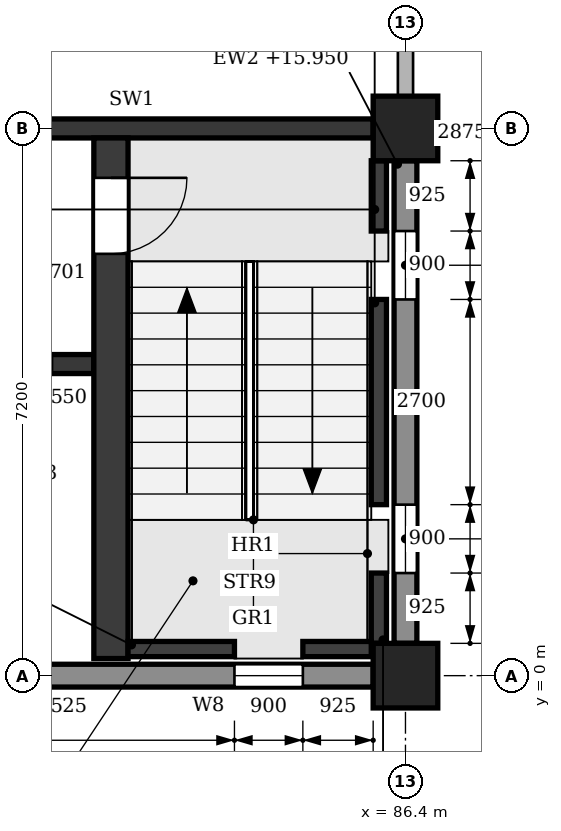
"""IFC4 building model, lengths in metres.
Left out: names, types, materials, properties, quantities, classifications, styles, units other than length and angle.
Written with IfcOpenShell. Run it as: python <this file> out.ifc"""

import sys

from ifc_helpers import new_model, si_unit, direction, frame, frame_2d, origin, origin_2d, place, context, subcontext, project, spatial, polyline, rectangle, outline, extrude, element, fill, save


model = new_model("IFC4")
c1 = context("Model", 3, precision=1e-05, world=origin(), true_north=direction((0.0, 1.0)))
c2 = subcontext(c1, "Body", "Model", "MODEL_VIEW")
j1 = project(units=[si_unit("LENGTHUNIT", "METRE"), si_unit("PLANEANGLEUNIT", "RADIAN")], contexts=[c1])
p1 = place(None, origin())
s1 = spatial("IfcSite", under=j1, at=p1, CompositionType="ELEMENT")
p2 = place(p1, origin())
s2 = spatial("IfcBuilding", under=s1, at=p2, CompositionType="ELEMENT")
p3 = place(p2, frame((0.0, 0.0, 11.4)))
s3 = spatial("IfcBuildingStorey", under=s2, at=p3, CompositionType="ELEMENT", Elevation=11.4)
for number, where, z_axis, x_axis in (
    (1, (86.4, 0.0, 0.0), (0.0, 0.0, 1.0), (1.0, 0.0, 0.0)),
    (2, (86.4, 7.2, 0.0), (0.0, 0.0, 1.0), (1.0, 0.0, 0.0)),
):
    element("IfcColumn", number, at=place(p3, frame(where, z_axis=z_axis, x_axis=x_axis)), inside=s3, PredefinedType="COLUMN", context=c2, shape_type="SweptSolid", body=[
        extrude(rectangle(XDim=0.85, YDim=0.85, at=origin_2d()), origin(), (0.0, 0.0, 1.0), 5.4),
    ])
p4 = place(p3, frame((79.625, 0.0, 0.0), z_axis=(0.0, 0.0, 1.0), x_axis=(1.0, 0.0, 0.0)))
e3 = element("IfcWall", 3, at=p4, inside=s3, PredefinedType="STANDARD", context=c2, shape_type="SweptSolid", body=[
    extrude(rectangle(XDim=6.35, YDim=0.3, at=frame_2d((3.175, 0.0))), origin(), (0.0, 0.0, 1.0), 4.55),
])
p5 = place(p4, frame((4.525, 0.0, 0.9)))
e4 = element("IfcOpeningElement", 4, at=p5, cuts=e3, PredefinedType="OPENING", context=c2, shape_type="SweptSolid", body=[
    extrude(outline(polyline([(0.0, 0.0), (0.9, 0.0), (0.9, 2.65), (0.45, 3.1), (0.0, 2.65), (0.0, 0.0)])), frame((0.0, 0.16, 0.0), z_axis=(0.0, -1.0, 0.0), x_axis=(1.0, 0.0, 0.0)), (0.0, 0.0, 1.0), 0.32),
])
p6 = place(p3, frame((86.4, 0.425, 0.0), z_axis=(0.0, 0.0, 1.0), x_axis=(0.0, 1.0, 0.0)))
e5 = element("IfcWall", 5, at=p6, inside=s3, PredefinedType="STANDARD", context=c2, shape_type="SweptSolid", body=[
    extrude(rectangle(XDim=6.35, YDim=0.3, at=frame_2d((3.175, 0.0))), origin(), (0.0, 0.0, 1.0), 4.55),
])
p7 = place(p6, frame((0.925, 0.0, 0.9)))
e6 = element("IfcOpeningElement", 6, at=p7, cuts=e5, PredefinedType="OPENING", context=c2, shape_type="SweptSolid", body=[
    extrude(outline(polyline([(0.0, 0.0), (0.9, 0.0), (0.9, 2.65), (0.45, 3.1), (0.0, 2.65), (0.0, 0.0)])), frame((0.0, 0.16, 0.0), z_axis=(0.0, -1.0, 0.0), x_axis=(1.0, 0.0, 0.0)), (0.0, 0.0, 1.0), 0.32),
])
p8 = place(p6, frame((4.525, 0.0, 0.9)))
e7 = element("IfcOpeningElement", 7, at=p8, cuts=e5, PredefinedType="OPENING", context=c2, shape_type="SweptSolid", body=[
    extrude(outline(polyline([(0.0, 0.0), (0.9, 0.0), (0.9, 2.65), (0.45, 3.1), (0.0, 2.65), (0.0, 0.0)])), frame((0.0, 0.16, 0.0), z_axis=(0.0, -1.0, 0.0), x_axis=(1.0, 0.0, 0.0)), (0.0, 0.0, 1.0), 0.32),
])
p9 = place(p3, frame((79.625, 7.2, 0.0), z_axis=(0.0, 0.0, 1.0), x_axis=(1.0, 0.0, 0.0)))
e8 = element("IfcWall", 8, at=p9, inside=s3, PredefinedType="SHEAR", context=c2, shape_type="SweptSolid", body=[
    extrude(rectangle(XDim=6.35, YDim=0.25, at=frame_2d((3.175, 0.0))), origin(), (0.0, 0.0, 1.0), 4.4),
])
p10 = place(p9, frame((0.425, 0.0, 0.0)))
e9 = element("IfcOpeningElement", 9, at=p10, cuts=e8, PredefinedType="OPENING", context=c2, shape_type="SweptSolid", body=[
    extrude(rectangle(XDim=1.1, YDim=2.1, at=frame_2d((0.55, 1.05))), frame((0.0, 0.135, 0.0), z_axis=(0.0, -1.0, 0.0), x_axis=(1.0, 0.0, 0.0)), (0.0, 0.0, 1.0), 0.27),
])
p11 = place(p3, frame((86.05, 0.425, -0.25), z_axis=(0.0, 0.0, 1.0), x_axis=(0.0, 1.0, 0.0)))
e10 = element("IfcWall", 10, at=p11, inside=s3, PredefinedType="SHEAR", context=c2, shape_type="SweptSolid", body=[
    extrude(rectangle(XDim=0.925, YDim=0.2, at=frame_2d((0.462, 0.0))), origin(), (0.0, 0.0, 1.0), 5.4),
])
p12 = place(p3, frame((86.05, 2.25, -0.25), z_axis=(0.0, 0.0, 1.0), x_axis=(0.0, 1.0, 0.0)))
e11 = element("IfcWall", 11, at=p12, inside=s3, PredefinedType="SHEAR", context=c2, shape_type="SweptSolid", body=[
    extrude(rectangle(XDim=2.7, YDim=0.2, at=frame_2d((1.35, 0.0))), origin(), (0.0, 0.0, 1.0), 5.4),
])
p13 = place(p3, frame((86.05, 5.85, -0.25), z_axis=(0.0, 0.0, 1.0), x_axis=(0.0, 1.0, 0.0)))
e12 = element("IfcWall", 12, at=p13, inside=s3, PredefinedType="SHEAR", context=c2, shape_type="SweptSolid", body=[
    extrude(rectangle(XDim=0.925, YDim=0.2, at=frame_2d((0.462, 0.0))), origin(), (0.0, 0.0, 1.0), 5.4),
])
p14 = place(p3, frame((82.75, 0.35, -0.25), z_axis=(0.0, 0.0, 1.0), x_axis=(1.0, 0.0, 0.0)))
e13 = element("IfcWall", 13, at=p14, inside=s3, PredefinedType="SHEAR", context=c2, shape_type="SweptSolid", body=[
    extrude(rectangle(XDim=1.4, YDim=0.2, at=frame_2d((0.7, 0.0))), origin(), (0.0, 0.0, 1.0), 5.4),
])
p15 = place(p3, frame((85.05, 0.35, -0.25), z_axis=(0.0, 0.0, 1.0), x_axis=(1.0, 0.0, 0.0)))
e14 = element("IfcWall", 14, at=p15, inside=s3, PredefinedType="SHEAR", context=c2, shape_type="SweptSolid", body=[
    extrude(rectangle(XDim=0.9, YDim=0.2, at=frame_2d((0.45, 0.0))), origin(), (0.0, 0.0, 1.0), 5.4),
])
p16 = place(p3, frame((82.525, 0.225, 0.0), z_axis=(0.0, 0.0, 1.0), x_axis=(0.0, 1.0, 0.0)))
e15 = element("IfcWall", 15, at=p16, inside=s3, PredefinedType="SHEAR", context=c2, shape_type="SweptSolid", body=[
    extrude(rectangle(XDim=6.85, YDim=0.45, at=frame_2d((3.425, 0.0))), origin(), (0.0, 0.0, 1.0), 5.15),
])
p17 = place(p16, frame((5.325, 0.0, 0.0)))
e16 = element("IfcOpeningElement", 16, at=p17, cuts=e15, PredefinedType="OPENING", context=c2, shape_type="SweptSolid", body=[
    extrude(rectangle(XDim=1.0, YDim=2.1, at=frame_2d((0.5, 1.05))), frame((0.0, 0.235, 0.0), z_axis=(0.0, -1.0, 0.0), x_axis=(1.0, 0.0, 0.0)), (0.0, 0.0, 1.0), 0.47),
])
p18 = place(p3, frame((79.325, 4.1, 0.0), z_axis=(0.0, 0.0, 1.0), x_axis=(1.0, 0.0, 0.0)))
e17 = element("IfcWall", 17, at=p18, inside=s3, PredefinedType="SHEAR", context=c2, shape_type="SweptSolid", body=[
    extrude(rectangle(XDim=2.975, YDim=0.25, at=frame_2d((1.488, 0.0))), origin(), (0.0, 0.0, 1.0), 5.15),
])
p19 = place(p18, frame((1.525, 0.0, 0.0)))
e18 = element("IfcOpeningElement", 18, at=p19, cuts=e17, PredefinedType="OPENING", context=c2, shape_type="SweptSolid", body=[
    extrude(rectangle(XDim=0.9, YDim=2.1, at=frame_2d((0.45, 1.05))), frame((0.0, 0.135, 0.0), z_axis=(0.0, -1.0, 0.0), x_axis=(1.0, 0.0, 0.0)), (0.0, 0.0, 1.0), 0.27),
])
p20 = place(p7, origin())
e19 = element("IfcWindow", 19, at=p20, inside=s3, PartitioningType="SINGLE_PANEL", PredefinedType="WINDOW", context=c2, shape_type="SweptSolid", body=[
    extrude(outline(polyline([(0.0, 0.0), (0.9, 0.0), (0.9, 2.65), (0.45, 3.1), (0.0, 2.65), (0.0, 0.0)])), frame((0.0, 0.03, 0.0), z_axis=(0.0, -1.0, 0.0), x_axis=(1.0, 0.0, 0.0)), (0.0, 0.0, 1.0), 0.06),
])
fill(e6, e19)
p21 = place(p8, origin())
e20 = element("IfcWindow", 20, at=p21, inside=s3, PartitioningType="SINGLE_PANEL", PredefinedType="WINDOW", context=c2, shape_type="SweptSolid", body=[
    extrude(outline(polyline([(0.0, 0.0), (0.9, 0.0), (0.9, 2.65), (0.45, 3.1), (0.0, 2.65), (0.0, 0.0)])), frame((0.0, 0.03, 0.0), z_axis=(0.0, -1.0, 0.0), x_axis=(1.0, 0.0, 0.0)), (0.0, 0.0, 1.0), 0.06),
])
fill(e7, e20)
p22 = place(p5, origin())
e21 = element("IfcWindow", 21, at=p22, inside=s3, PartitioningType="SINGLE_PANEL", PredefinedType="WINDOW", context=c2, shape_type="SweptSolid", body=[
    extrude(outline(polyline([(0.0, 0.0), (0.9, 0.0), (0.9, 2.65), (0.45, 3.1), (0.0, 2.65), (0.0, 0.0)])), frame((0.0, 0.03, 0.0), z_axis=(0.0, -1.0, 0.0), x_axis=(1.0, 0.0, 0.0)), (0.0, 0.0, 1.0), 0.06),
])
fill(e4, e21)
p23 = place(p17, frame((1.0, 0.0, 0.0), z_axis=(0.0, 0.0, 1.0), x_axis=(-1.0, 0.0, 0.0)))
e22 = element("IfcDoor", 22, at=p23, inside=s3, OperationType="SINGLE_SWING_LEFT", PredefinedType="DOOR", context=c2, shape_type="SweptSolid", body=[
    extrude(rectangle(XDim=1.0, YDim=2.1, at=frame_2d((0.5, 1.05))), frame((0.0, 0.025, 0.0), z_axis=(0.0, -1.0, 0.0), x_axis=(1.0, 0.0, 0.0)), (0.0, 0.0, 1.0), 0.05),
])
fill(e16, e22)
save(model, sys.argv[1])
